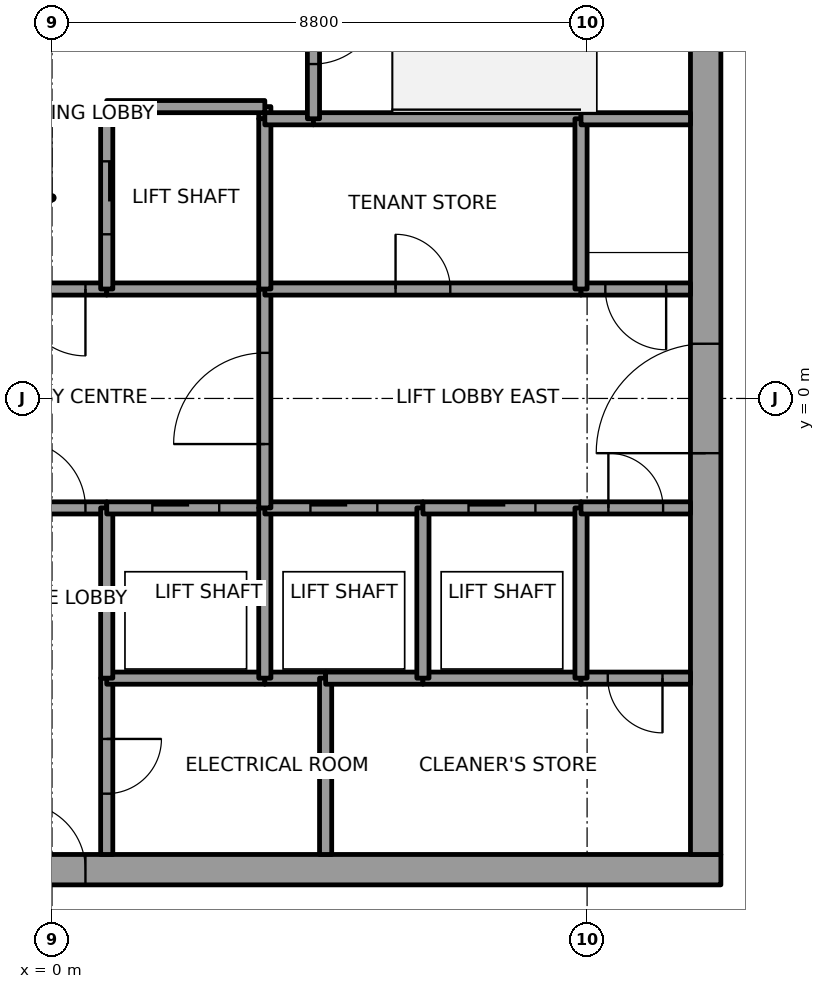
"""IFC4 building model, lengths in metres.
Left out: names, types, materials, properties, quantities, classifications, styles, units other than length and angle.
Written with IfcOpenShell. Run it as: python <this file> out.ifc"""

import sys

from ifc_helpers import new_model, si_unit, direction, frame, frame_2d, origin, place, context, subcontext, project, spatial, rectangle, extrude, element, fill, save


model = new_model("IFC4")
c1 = context("Model", 3, precision=1e-05, world=origin(), true_north=direction((0.0, 1.0)))
c2 = subcontext(c1, "Body", "Model", "MODEL_VIEW")
j1 = project(units=[si_unit("LENGTHUNIT", "METRE"), si_unit("PLANEANGLEUNIT", "RADIAN")], contexts=[c1])
p1 = place(None, origin())
s1 = spatial("IfcSite", under=j1, at=p1, CompositionType="ELEMENT")
p2 = place(p1, origin())
s2 = spatial("IfcBuilding", under=s1, at=p2, CompositionType="ELEMENT")
p3 = place(p2, frame((0.0, 0.0, 231.0)))
s3 = spatial("IfcBuildingStorey", under=s2, at=p3, CompositionType="ELEMENT", Elevation=231.0)
p4 = place(p3, frame((-11.0, -7.75, 0.0), z_axis=(0.0, 0.0, 1.0), x_axis=(1.0, 0.0, 0.0)))
e1 = element("IfcWall", 1, at=p4, inside=s3, PredefinedType="SHEAR", context=c2, shape_type="SweptSolid", body=[
    extrude(rectangle(XDim=22.0, YDim=0.5, at=frame_2d((11.0, 0.0))), origin(), (0.0, 0.0, 1.0), 4.0),
])
p5 = place(p4, frame((10.45, 0.0, 0.0)))
e2 = element("IfcOpeningElement", 2, at=p5, cuts=e1, PredefinedType="OPENING", context=c2, shape_type="SweptSolid", body=[
    extrude(rectangle(XDim=1.1, YDim=2.1, at=frame_2d((0.55, 1.05))), frame((0.0, 0.25, 0.0), z_axis=(0.0, -1.0, 0.0), x_axis=(1.0, 0.0, 0.0)), (0.0, 0.0, 1.0), 0.5),
])
p6 = place(p3, frame((10.75, -7.5, 0.0), z_axis=(0.0, 0.0, 1.0), x_axis=(0.0, 1.0, 0.0)))
e3 = element("IfcWall", 3, at=p6, inside=s3, PredefinedType="SHEAR", context=c2, shape_type="SweptSolid", body=[
    extrude(rectangle(XDim=15.0, YDim=0.5, at=frame_2d((7.5, 0.0))), origin(), (0.0, 0.0, 1.0), 4.0),
])
p7 = place(p6, frame((6.6, 0.0, 0.0)))
e4 = element("IfcOpeningElement", 4, at=p7, cuts=e3, PredefinedType="OPENING", context=c2, shape_type="SweptSolid", body=[
    extrude(rectangle(XDim=1.8, YDim=2.1, at=frame_2d((0.9, 1.05))), frame((0.0, 0.25, 0.0), z_axis=(0.0, -1.0, 0.0), x_axis=(1.0, 0.0, 0.0)), (0.0, 0.0, 1.0), 0.5),
])
p8 = place(p3, frame((-0.9, -1.8, 0.0), z_axis=(0.0, 0.0, 1.0), x_axis=(1.0, 0.0, 0.0)))
e5 = element("IfcWall", 5, at=p8, inside=s3, PredefinedType="SOLIDWALL", context=c2, shape_type="SweptSolid", body=[
    extrude(rectangle(XDim=1.8, YDim=0.2, at=frame_2d((0.9, 0.0))), origin(), (0.0, 0.0, 1.0), 3.85),
])
p9 = place(p8, frame((0.35, 0.0, 0.0)))
e6 = element("IfcOpeningElement", 6, at=p9, cuts=e5, PredefinedType="OPENING", context=c2, shape_type="SweptSolid", body=[
    extrude(rectangle(XDim=1.1, YDim=2.1, at=frame_2d((0.55, 1.05))), frame((0.0, 0.1, 0.0), z_axis=(0.0, -1.0, 0.0), x_axis=(1.0, 0.0, 0.0)), (0.0, 0.0, 1.0), 0.2),
])
p10 = place(p3, frame((0.9, 1.8, 0.0), z_axis=(0.0, 0.0, 1.0), x_axis=(-1.0, 0.0, 0.0)))
e7 = element("IfcWall", 7, at=p10, inside=s3, PredefinedType="SOLIDWALL", context=c2, shape_type="SweptSolid", body=[
    extrude(rectangle(XDim=1.8, YDim=0.2, at=frame_2d((0.9, 0.0))), origin(), (0.0, 0.0, 1.0), 3.85),
])
p11 = place(p10, frame((0.35, 0.0, 0.0)))
e8 = element("IfcOpeningElement", 8, at=p11, cuts=e7, PredefinedType="OPENING", context=c2, shape_type="SweptSolid", body=[
    extrude(rectangle(XDim=1.1, YDim=2.1, at=frame_2d((0.55, 1.05))), frame((0.0, 0.1, 0.0), z_axis=(0.0, -1.0, 0.0), x_axis=(1.0, 0.0, 0.0)), (0.0, 0.0, 1.0), 0.2),
])
p12 = place(p3, frame((0.9, -4.6, 0.0), z_axis=(0.0, 0.0, 1.0), x_axis=(0.0, -1.0, 0.0)))
e9 = element("IfcWall", 9, at=p12, inside=s3, PredefinedType="SOLIDWALL", context=c2, shape_type="SweptSolid", body=[
    extrude(rectangle(XDim=2.9, YDim=0.2, at=frame_2d((1.45, 0.0))), origin(), (0.0, 0.0, 1.0), 3.85),
])
p13 = place(p12, frame((1.0, 0.0, 0.0)))
e10 = element("IfcOpeningElement", 10, at=p13, cuts=e9, PredefinedType="OPENING", context=c2, shape_type="SweptSolid", body=[
    extrude(rectangle(XDim=0.9, YDim=2.1, at=frame_2d((0.45, 1.05))), frame((0.0, 0.1, 0.0), z_axis=(0.0, -1.0, 0.0), x_axis=(1.0, 0.0, 0.0)), (0.0, 0.0, 1.0), 0.2),
])
p14 = place(p3, frame((3.5, -4.6, 0.0), z_axis=(0.0, 0.0, 1.0), x_axis=(-1.0, 0.0, 0.0)))
e11 = element("IfcWall", 11, at=p14, inside=s3, PredefinedType="SOLIDWALL", context=c2, shape_type="SweptSolid", body=[
    extrude(rectangle(XDim=2.6, YDim=0.2, at=frame_2d((1.3, 0.0))), origin(), (0.0, 0.0, 1.0), 3.85),
])
p15 = place(p3, frame((0.9, -1.8, 0.0), z_axis=(0.0, 0.0, 1.0), x_axis=(0.0, -1.0, 0.0)))
e12 = element("IfcWall", 12, at=p15, inside=s3, PredefinedType="SOLIDWALL", context=c2, shape_type="SweptSolid", body=[
    extrude(rectangle(XDim=2.8, YDim=0.2, at=frame_2d((1.4, 0.0))), origin(), (0.0, 0.0, 1.0), 3.85),
])
p16 = place(p3, frame((0.9, -1.8, 0.0), z_axis=(0.0, 0.0, 1.0), x_axis=(1.0, 0.0, 0.0)))
e13 = element("IfcWall", 13, at=p16, inside=s3, PredefinedType="SOLIDWALL", context=c2, shape_type="SweptSolid", body=[
    extrude(rectangle(XDim=2.6, YDim=0.2, at=frame_2d((1.3, 0.0))), origin(), (0.0, 0.0, 1.0), 3.85),
])
p17 = place(p16, frame((0.75, 0.0, 0.0)))
e14 = element("IfcOpeningElement", 14, at=p17, cuts=e13, PredefinedType="OPENING", context=c2, shape_type="SweptSolid", body=[
    extrude(rectangle(XDim=1.1, YDim=2.1, at=frame_2d((0.55, 1.05))), frame((0.0, 0.1, 0.0), z_axis=(0.0, -1.0, 0.0), x_axis=(1.0, 0.0, 0.0)), (0.0, 0.0, 1.0), 0.2),
])
p18 = place(p3, frame((3.5, 1.8, 0.0), z_axis=(0.0, 0.0, 1.0), x_axis=(-1.0, 0.0, 0.0)))
e15 = element("IfcWall", 15, at=p18, inside=s3, PredefinedType="SOLIDWALL", context=c2, shape_type="SweptSolid", body=[
    extrude(rectangle(XDim=2.6, YDim=0.2, at=frame_2d((1.3, 0.0))), origin(), (0.0, 0.0, 1.0), 3.85),
])
p19 = place(p3, frame((3.5, 4.6, 0.0), z_axis=(0.0, 0.0, 1.0), x_axis=(0.0, 1.0, 0.0)))
e16 = element("IfcWall", 16, at=p19, inside=s3, PredefinedType="SOLIDWALL", context=c2, shape_type="SweptSolid", body=[
    extrude(rectangle(XDim=0.2, YDim=0.2, at=frame_2d((0.1, 0.0))), origin(), (0.0, 0.0, 1.0), 3.85),
])
p20 = place(p3, frame((3.5, 4.8, 0.0), z_axis=(0.0, 0.0, 1.0), x_axis=(-1.0, 0.0, 0.0)))
e17 = element("IfcWall", 17, at=p20, inside=s3, PredefinedType="SOLIDWALL", context=c2, shape_type="SweptSolid", body=[
    extrude(rectangle(XDim=2.6, YDim=0.2, at=frame_2d((1.3, 0.0))), origin(), (0.0, 0.0, 1.0), 3.85),
])
p21 = place(p3, frame((0.9, 4.8, 0.0), z_axis=(0.0, 0.0, 1.0), x_axis=(0.0, -1.0, 0.0)))
e18 = element("IfcWall", 18, at=p21, inside=s3, PredefinedType="SOLIDWALL", context=c2, shape_type="SweptSolid", body=[
    extrude(rectangle(XDim=3.0, YDim=0.2, at=frame_2d((1.5, 0.0))), origin(), (0.0, 0.0, 1.0), 3.85),
])
p22 = place(p21, frame((0.9, 0.0, 0.0)))
e19 = element("IfcOpeningElement", 19, at=p22, cuts=e18, PredefinedType="OPENING", context=c2, shape_type="SweptSolid", body=[
    extrude(rectangle(XDim=1.2, YDim=2.1, at=frame_2d((0.6, 1.05))), frame((0.0, 0.1, 0.0), z_axis=(0.0, -1.0, 0.0), x_axis=(1.0, 0.0, 0.0)), (0.0, 0.0, 1.0), 0.2),
])
p23 = place(p3, frame((4.5, -4.6, 0.0), z_axis=(0.0, 0.0, 1.0), x_axis=(-1.0, 0.0, 0.0)))
e20 = element("IfcWall", 20, at=p23, inside=s3, PredefinedType="SOLIDWALL", context=c2, shape_type="SweptSolid", body=[
    extrude(rectangle(XDim=1.0, YDim=0.2, at=frame_2d((0.5, 0.0))), origin(), (0.0, 0.0, 1.0), 3.85),
])
p24 = place(p3, frame((3.5, -4.6, 0.0), z_axis=(0.0, 0.0, 1.0), x_axis=(0.0, 1.0, 0.0)))
e21 = element("IfcWall", 21, at=p24, inside=s3, PredefinedType="SOLIDWALL", context=c2, shape_type="SweptSolid", body=[
    extrude(rectangle(XDim=2.8, YDim=0.2, at=frame_2d((1.4, 0.0))), origin(), (0.0, 0.0, 1.0), 3.85),
])
p25 = place(p3, frame((3.5, -1.8, 0.0), z_axis=(0.0, 0.0, 1.0), x_axis=(1.0, 0.0, 0.0)))
e22 = element("IfcWall", 22, at=p25, inside=s3, PredefinedType="SOLIDWALL", context=c2, shape_type="SweptSolid", body=[
    extrude(rectangle(XDim=2.6, YDim=0.2, at=frame_2d((1.3, 0.0))), origin(), (0.0, 0.0, 1.0), 3.85),
])
p26 = place(p25, frame((0.75, 0.0, 0.0)))
e23 = element("IfcOpeningElement", 23, at=p26, cuts=e22, PredefinedType="OPENING", context=c2, shape_type="SweptSolid", body=[
    extrude(rectangle(XDim=1.1, YDim=2.1, at=frame_2d((0.55, 1.05))), frame((0.0, 0.1, 0.0), z_axis=(0.0, -1.0, 0.0), x_axis=(1.0, 0.0, 0.0)), (0.0, 0.0, 1.0), 0.2),
])
p27 = place(p3, frame((3.5, -1.8, 0.0), z_axis=(0.0, 0.0, 1.0), x_axis=(0.0, 1.0, 0.0)))
e24 = element("IfcWall", 24, at=p27, inside=s3, PredefinedType="SOLIDWALL", context=c2, shape_type="SweptSolid", body=[
    extrude(rectangle(XDim=3.6, YDim=0.2, at=frame_2d((1.8, 0.0))), origin(), (0.0, 0.0, 1.0), 3.85),
])
p28 = place(p27, frame((1.05, 0.0, 0.0)))
e25 = element("IfcOpeningElement", 25, at=p28, cuts=e24, PredefinedType="OPENING", context=c2, shape_type="SweptSolid", body=[
    extrude(rectangle(XDim=1.5, YDim=2.1, at=frame_2d((0.75, 1.05))), frame((0.0, 0.1, 0.0), z_axis=(0.0, -1.0, 0.0), x_axis=(1.0, 0.0, 0.0)), (0.0, 0.0, 1.0), 0.2),
])
p29 = place(p3, frame((3.5, 1.8, 0.0), z_axis=(0.0, 0.0, 1.0), x_axis=(1.0, 0.0, 0.0)))
e26 = element("IfcWall", 26, at=p29, inside=s3, PredefinedType="SOLIDWALL", context=c2, shape_type="SweptSolid", body=[
    extrude(rectangle(XDim=5.2, YDim=0.2, at=frame_2d((2.6, 0.0))), origin(), (0.0, 0.0, 1.0), 3.85),
])
p30 = place(p29, frame((2.15, 0.0, 0.0)))
e27 = element("IfcOpeningElement", 27, at=p30, cuts=e26, PredefinedType="OPENING", context=c2, shape_type="SweptSolid", body=[
    extrude(rectangle(XDim=0.9, YDim=2.1, at=frame_2d((0.45, 1.05))), frame((0.0, 0.1, 0.0), z_axis=(0.0, -1.0, 0.0), x_axis=(1.0, 0.0, 0.0)), (0.0, 0.0, 1.0), 0.2),
])
p31 = place(p3, frame((3.5, 4.6, 0.0), z_axis=(0.0, 0.0, 1.0), x_axis=(0.0, -1.0, 0.0)))
e28 = element("IfcWall", 28, at=p31, inside=s3, PredefinedType="SOLIDWALL", context=c2, shape_type="SweptSolid", body=[
    extrude(rectangle(XDim=2.8, YDim=0.2, at=frame_2d((1.4, 0.0))), origin(), (0.0, 0.0, 1.0), 3.85),
])
p32 = place(p3, frame((4.3, 4.6, 0.0), z_axis=(0.0, 0.0, 1.0), x_axis=(-1.0, 0.0, 0.0)))
e29 = element("IfcWall", 29, at=p32, inside=s3, PredefinedType="SOLIDWALL", context=c2, shape_type="SweptSolid", body=[
    extrude(rectangle(XDim=0.8, YDim=0.2, at=frame_2d((0.4, 0.0))), origin(), (0.0, 0.0, 1.0), 3.85),
])
p33 = place(p3, frame((8.7, 4.6, 0.0), z_axis=(0.0, 0.0, 1.0), x_axis=(-1.0, 0.0, 0.0)))
e30 = element("IfcWall", 30, at=p33, inside=s3, PredefinedType="SOLIDWALL", context=c2, shape_type="SweptSolid", body=[
    extrude(rectangle(XDim=4.4, YDim=0.2, at=frame_2d((2.2, 0.0))), origin(), (0.0, 0.0, 1.0), 3.85),
])
p34 = place(p3, frame((4.3, 7.5, 0.0), z_axis=(0.0, 0.0, 1.0), x_axis=(0.0, -1.0, 0.0)))
e31 = element("IfcWall", 31, at=p34, inside=s3, PredefinedType="SOLIDWALL", context=c2, shape_type="SweptSolid", body=[
    extrude(rectangle(XDim=2.9, YDim=0.2, at=frame_2d((1.45, 0.0))), origin(), (0.0, 0.0, 1.0), 3.85),
])
p35 = place(p34, frame((0.9, 0.0, 0.0)))
e32 = element("IfcOpeningElement", 32, at=p35, cuts=e31, PredefinedType="OPENING", context=c2, shape_type="SweptSolid", body=[
    extrude(rectangle(XDim=1.1, YDim=2.1, at=frame_2d((0.55, 1.05))), frame((0.0, 0.1, 0.0), z_axis=(0.0, -1.0, 0.0), x_axis=(1.0, 0.0, 0.0)), (0.0, 0.0, 1.0), 0.2),
])
p36 = place(p3, frame((4.5, -4.6, 0.0), z_axis=(0.0, 0.0, 1.0), x_axis=(0.0, -1.0, 0.0)))
e33 = element("IfcWall", 33, at=p36, inside=s3, PredefinedType="SOLIDWALL", context=c2, shape_type="SweptSolid", body=[
    extrude(rectangle(XDim=2.9, YDim=0.2, at=frame_2d((1.45, 0.0))), origin(), (0.0, 0.0, 1.0), 3.85),
])
p37 = place(p3, frame((6.1, -4.6, 0.0), z_axis=(0.0, 0.0, 1.0), x_axis=(-1.0, 0.0, 0.0)))
e34 = element("IfcWall", 34, at=p37, inside=s3, PredefinedType="SOLIDWALL", context=c2, shape_type="SweptSolid", body=[
    extrude(rectangle(XDim=1.6, YDim=0.2, at=frame_2d((0.8, 0.0))), origin(), (0.0, 0.0, 1.0), 3.85),
])
p38 = place(p3, frame((8.7, -4.6, 0.0), z_axis=(0.0, 0.0, 1.0), x_axis=(-1.0, 0.0, 0.0)))
e35 = element("IfcWall", 35, at=p38, inside=s3, PredefinedType="SOLIDWALL", context=c2, shape_type="SweptSolid", body=[
    extrude(rectangle(XDim=2.6, YDim=0.2, at=frame_2d((1.3, 0.0))), origin(), (0.0, 0.0, 1.0), 3.85),
])
p39 = place(p3, frame((6.1, -4.6, 0.0), z_axis=(0.0, 0.0, 1.0), x_axis=(0.0, 1.0, 0.0)))
e36 = element("IfcWall", 36, at=p39, inside=s3, PredefinedType="SOLIDWALL", context=c2, shape_type="SweptSolid", body=[
    extrude(rectangle(XDim=2.8, YDim=0.2, at=frame_2d((1.4, 0.0))), origin(), (0.0, 0.0, 1.0), 3.85),
])
p40 = place(p3, frame((6.1, -1.8, 0.0), z_axis=(0.0, 0.0, 1.0), x_axis=(1.0, 0.0, 0.0)))
e37 = element("IfcWall", 37, at=p40, inside=s3, PredefinedType="SOLIDWALL", context=c2, shape_type="SweptSolid", body=[
    extrude(rectangle(XDim=2.6, YDim=0.2, at=frame_2d((1.3, 0.0))), origin(), (0.0, 0.0, 1.0), 3.85),
])
p41 = place(p40, frame((0.75, 0.0, 0.0)))
e38 = element("IfcOpeningElement", 38, at=p41, cuts=e37, PredefinedType="OPENING", context=c2, shape_type="SweptSolid", body=[
    extrude(rectangle(XDim=1.1, YDim=2.1, at=frame_2d((0.55, 1.05))), frame((0.0, 0.1, 0.0), z_axis=(0.0, -1.0, 0.0), x_axis=(1.0, 0.0, 0.0)), (0.0, 0.0, 1.0), 0.2),
])
p42 = place(p3, frame((10.5, -4.6, 0.0), z_axis=(0.0, 0.0, 1.0), x_axis=(-1.0, 0.0, 0.0)))
e39 = element("IfcWall", 39, at=p42, inside=s3, PredefinedType="SOLIDWALL", context=c2, shape_type="SweptSolid", body=[
    extrude(rectangle(XDim=1.8, YDim=0.2, at=frame_2d((0.9, 0.0))), origin(), (0.0, 0.0, 1.0), 3.85),
])
p43 = place(p42, frame((0.46, 0.0, 0.0)))
e40 = element("IfcOpeningElement", 40, at=p43, cuts=e39, PredefinedType="OPENING", context=c2, shape_type="SweptSolid", body=[
    extrude(rectangle(XDim=0.9, YDim=2.1, at=frame_2d((0.45, 1.05))), frame((0.0, 0.1, 0.0), z_axis=(0.0, -1.0, 0.0), x_axis=(1.0, 0.0, 0.0)), (0.0, 0.0, 1.0), 0.2),
])
p44 = place(p3, frame((8.7, -1.8, 0.0), z_axis=(0.0, 0.0, 1.0), x_axis=(0.0, -1.0, 0.0)))
e41 = element("IfcWall", 41, at=p44, inside=s3, PredefinedType="SOLIDWALL", context=c2, shape_type="SweptSolid", body=[
    extrude(rectangle(XDim=2.8, YDim=0.2, at=frame_2d((1.4, 0.0))), origin(), (0.0, 0.0, 1.0), 3.85),
])
p45 = place(p3, frame((8.7, -1.8, 0.0), z_axis=(0.0, 0.0, 1.0), x_axis=(1.0, 0.0, 0.0)))
e42 = element("IfcWall", 42, at=p45, inside=s3, PredefinedType="SOLIDWALL", context=c2, shape_type="SweptSolid", body=[
    extrude(rectangle(XDim=1.8, YDim=0.2, at=frame_2d((0.9, 0.0))), origin(), (0.0, 0.0, 1.0), 3.85),
])
p46 = place(p45, frame((0.45, 0.0, 0.0)))
e43 = element("IfcOpeningElement", 43, at=p46, cuts=e42, PredefinedType="OPENING", context=c2, shape_type="SweptSolid", body=[
    extrude(rectangle(XDim=0.9, YDim=2.1, at=frame_2d((0.45, 1.05))), frame((0.0, 0.1, 0.0), z_axis=(0.0, -1.0, 0.0), x_axis=(1.0, 0.0, 0.0)), (0.0, 0.0, 1.0), 0.2),
])
p47 = place(p3, frame((10.5, 1.8, 0.0), z_axis=(0.0, 0.0, 1.0), x_axis=(-1.0, 0.0, 0.0)))
e44 = element("IfcWall", 44, at=p47, inside=s3, PredefinedType="SOLIDWALL", context=c2, shape_type="SweptSolid", body=[
    extrude(rectangle(XDim=1.8, YDim=0.2, at=frame_2d((0.9, 0.0))), origin(), (0.0, 0.0, 1.0), 3.85),
])
p48 = place(p47, frame((0.4, 0.0, 0.0)))
e45 = element("IfcOpeningElement", 45, at=p48, cuts=e44, PredefinedType="OPENING", context=c2, shape_type="SweptSolid", body=[
    extrude(rectangle(XDim=1.0, YDim=2.1, at=frame_2d((0.5, 1.05))), frame((0.0, 0.1, 0.0), z_axis=(0.0, -1.0, 0.0), x_axis=(1.0, 0.0, 0.0)), (0.0, 0.0, 1.0), 0.2),
])
p49 = place(p3, frame((8.7, 1.8, 0.0), z_axis=(0.0, 0.0, 1.0), x_axis=(0.0, 1.0, 0.0)))
e46 = element("IfcWall", 46, at=p49, inside=s3, PredefinedType="SOLIDWALL", context=c2, shape_type="SweptSolid", body=[
    extrude(rectangle(XDim=2.8, YDim=0.2, at=frame_2d((1.4, 0.0))), origin(), (0.0, 0.0, 1.0), 3.85),
])
p50 = place(p3, frame((10.5, 4.6, 0.0), z_axis=(0.0, 0.0, 1.0), x_axis=(-1.0, 0.0, 0.0)))
e47 = element("IfcWall", 47, at=p50, inside=s3, PredefinedType="SOLIDWALL", context=c2, shape_type="SweptSolid", body=[
    extrude(rectangle(XDim=1.8, YDim=0.2, at=frame_2d((0.9, 0.0))), origin(), (0.0, 0.0, 1.0), 3.85),
])
p51 = place(p17, origin())
e48 = element("IfcDoor", 48, at=p51, inside=s3, OperationType="SLIDING_TO_LEFT", PredefinedType="DOOR", context=c2, shape_type="SweptSolid", body=[
    extrude(rectangle(XDim=1.1, YDim=2.1, at=frame_2d((0.55, 1.05))), frame((0.0, 0.025, 0.0), z_axis=(0.0, -1.0, 0.0), x_axis=(1.0, 0.0, 0.0)), (0.0, 0.0, 1.0), 0.05),
])
fill(e14, e48)
p52 = place(p26, origin())
e49 = element("IfcDoor", 49, at=p52, inside=s3, OperationType="SLIDING_TO_RIGHT", PredefinedType="DOOR", context=c2, shape_type="SweptSolid", body=[
    extrude(rectangle(XDim=1.1, YDim=2.1, at=frame_2d((0.55, 1.05))), frame((0.0, 0.025, 0.0), z_axis=(0.0, -1.0, 0.0), x_axis=(1.0, 0.0, 0.0)), (0.0, 0.0, 1.0), 0.05),
])
fill(e23, e49)
p53 = place(p41, origin())
e50 = element("IfcDoor", 50, at=p53, inside=s3, OperationType="SLIDING_TO_LEFT", PredefinedType="DOOR", context=c2, shape_type="SweptSolid", body=[
    extrude(rectangle(XDim=1.1, YDim=2.1, at=frame_2d((0.55, 1.05))), frame((0.0, 0.025, 0.0), z_axis=(0.0, -1.0, 0.0), x_axis=(1.0, 0.0, 0.0)), (0.0, 0.0, 1.0), 0.05),
])
fill(e38, e50)
p54 = place(p22, origin())
e51 = element("IfcDoor", 51, at=p54, inside=s3, OperationType="SLIDING_TO_LEFT", PredefinedType="DOOR", context=c2, shape_type="SweptSolid", body=[
    extrude(rectangle(XDim=1.2, YDim=2.1, at=frame_2d((0.6, 1.05))), frame((0.0, 0.025, 0.0), z_axis=(0.0, -1.0, 0.0), x_axis=(1.0, 0.0, 0.0)), (0.0, 0.0, 1.0), 0.05),
])
fill(e19, e51)
p55 = place(p28, origin())
e52 = element("IfcDoor", 52, at=p55, inside=s3, OperationType="DOUBLE_DOOR_SINGLE_SWING", PredefinedType="DOOR", context=c2, shape_type="SweptSolid", body=[
    extrude(rectangle(XDim=1.5, YDim=2.1, at=frame_2d((0.75, 1.05))), frame((0.0, 0.025, 0.0), z_axis=(0.0, -1.0, 0.0), x_axis=(1.0, 0.0, 0.0)), (0.0, 0.0, 1.0), 0.05),
])
fill(e25, e52)
p56 = place(p11, origin())
e53 = element("IfcDoor", 53, at=p56, inside=s3, OperationType="SINGLE_SWING_RIGHT", PredefinedType="DOOR", context=c2, shape_type="SweptSolid", body=[
    extrude(rectangle(XDim=1.1, YDim=2.1, at=frame_2d((0.55, 1.05))), frame((0.0, 0.025, 0.0), z_axis=(0.0, -1.0, 0.0), x_axis=(1.0, 0.0, 0.0)), (0.0, 0.0, 1.0), 0.05),
])
fill(e8, e53)
p57 = place(p9, origin())
e54 = element("IfcDoor", 54, at=p57, inside=s3, OperationType="SINGLE_SWING_RIGHT", PredefinedType="DOOR", context=c2, shape_type="SweptSolid", body=[
    extrude(rectangle(XDim=1.1, YDim=2.1, at=frame_2d((0.55, 1.05))), frame((0.0, 0.025, 0.0), z_axis=(0.0, -1.0, 0.0), x_axis=(1.0, 0.0, 0.0)), (0.0, 0.0, 1.0), 0.05),
])
fill(e6, e54)
p58 = place(p48, origin())
e55 = element("IfcDoor", 55, at=p58, inside=s3, OperationType="SINGLE_SWING_LEFT", PredefinedType="DOOR", context=c2, shape_type="SweptSolid", body=[
    extrude(rectangle(XDim=1.0, YDim=2.1, at=frame_2d((0.5, 1.05))), frame((0.0, 0.025, 0.0), z_axis=(0.0, -1.0, 0.0), x_axis=(1.0, 0.0, 0.0)), (0.0, 0.0, 1.0), 0.05),
])
fill(e45, e55)
p59 = place(p35, origin())
e56 = element("IfcDoor", 56, at=p59, inside=s3, OperationType="SINGLE_SWING_RIGHT", PredefinedType="DOOR", context=c2, shape_type="SweptSolid", body=[
    extrude(rectangle(XDim=1.1, YDim=2.1, at=frame_2d((0.55, 1.05))), frame((0.0, 0.025, 0.0), z_axis=(0.0, -1.0, 0.0), x_axis=(1.0, 0.0, 0.0)), (0.0, 0.0, 1.0), 0.05),
])
fill(e32, e56)
p60 = place(p30, origin())
e57 = element("IfcDoor", 57, at=p60, inside=s3, OperationType="SINGLE_SWING_RIGHT", PredefinedType="DOOR", context=c2, shape_type="SweptSolid", body=[
    extrude(rectangle(XDim=0.9, YDim=2.1, at=frame_2d((0.45, 1.05))), frame((0.0, 0.025, 0.0), z_axis=(0.0, -1.0, 0.0), x_axis=(1.0, 0.0, 0.0)), (0.0, 0.0, 1.0), 0.05),
])
fill(e27, e57)
p61 = place(p43, origin())
e58 = element("IfcDoor", 58, at=p61, inside=s3, OperationType="SINGLE_SWING_LEFT", PredefinedType="DOOR", context=c2, shape_type="SweptSolid", body=[
    extrude(rectangle(XDim=0.9, YDim=2.1, at=frame_2d((0.45, 1.05))), frame((0.0, 0.025, 0.0), z_axis=(0.0, -1.0, 0.0), x_axis=(1.0, 0.0, 0.0)), (0.0, 0.0, 1.0), 0.05),
])
fill(e40, e58)
p62 = place(p46, origin())
e59 = element("IfcDoor", 59, at=p62, inside=s3, OperationType="SINGLE_SWING_LEFT", PredefinedType="DOOR", context=c2, shape_type="SweptSolid", body=[
    extrude(rectangle(XDim=0.9, YDim=2.1, at=frame_2d((0.45, 1.05))), frame((0.0, 0.025, 0.0), z_axis=(0.0, -1.0, 0.0), x_axis=(1.0, 0.0, 0.0)), (0.0, 0.0, 1.0), 0.05),
])
fill(e43, e59)
p63 = place(p13, origin())
e60 = element("IfcDoor", 60, at=p63, inside=s3, OperationType="SINGLE_SWING_RIGHT", PredefinedType="DOOR", context=c2, shape_type="SweptSolid", body=[
    extrude(rectangle(XDim=0.9, YDim=2.1, at=frame_2d((0.45, 1.05))), frame((0.0, 0.025, 0.0), z_axis=(0.0, -1.0, 0.0), x_axis=(1.0, 0.0, 0.0)), (0.0, 0.0, 1.0), 0.05),
])
fill(e10, e60)
p64 = place(p7, origin())
e61 = element("IfcDoor", 61, at=p64, inside=s3, OperationType="DOUBLE_DOOR_SINGLE_SWING", PredefinedType="DOOR", context=c2, shape_type="SweptSolid", body=[
    extrude(rectangle(XDim=1.8, YDim=2.1, at=frame_2d((0.9, 1.05))), frame((0.0, 0.025, 0.0), z_axis=(0.0, -1.0, 0.0), x_axis=(1.0, 0.0, 0.0)), (0.0, 0.0, 1.0), 0.05),
])
fill(e4, e61)
p65 = place(p5, origin())
e62 = element("IfcDoor", 62, at=p65, inside=s3, OperationType="SINGLE_SWING_RIGHT", PredefinedType="DOOR", context=c2, shape_type="SweptSolid", body=[
    extrude(rectangle(XDim=1.1, YDim=2.1, at=frame_2d((0.55, 1.05))), frame((0.0, 0.025, 0.0), z_axis=(0.0, -1.0, 0.0), x_axis=(1.0, 0.0, 0.0)), (0.0, 0.0, 1.0), 0.05),
])
fill(e2, e62)
save(model, sys.argv[1])
